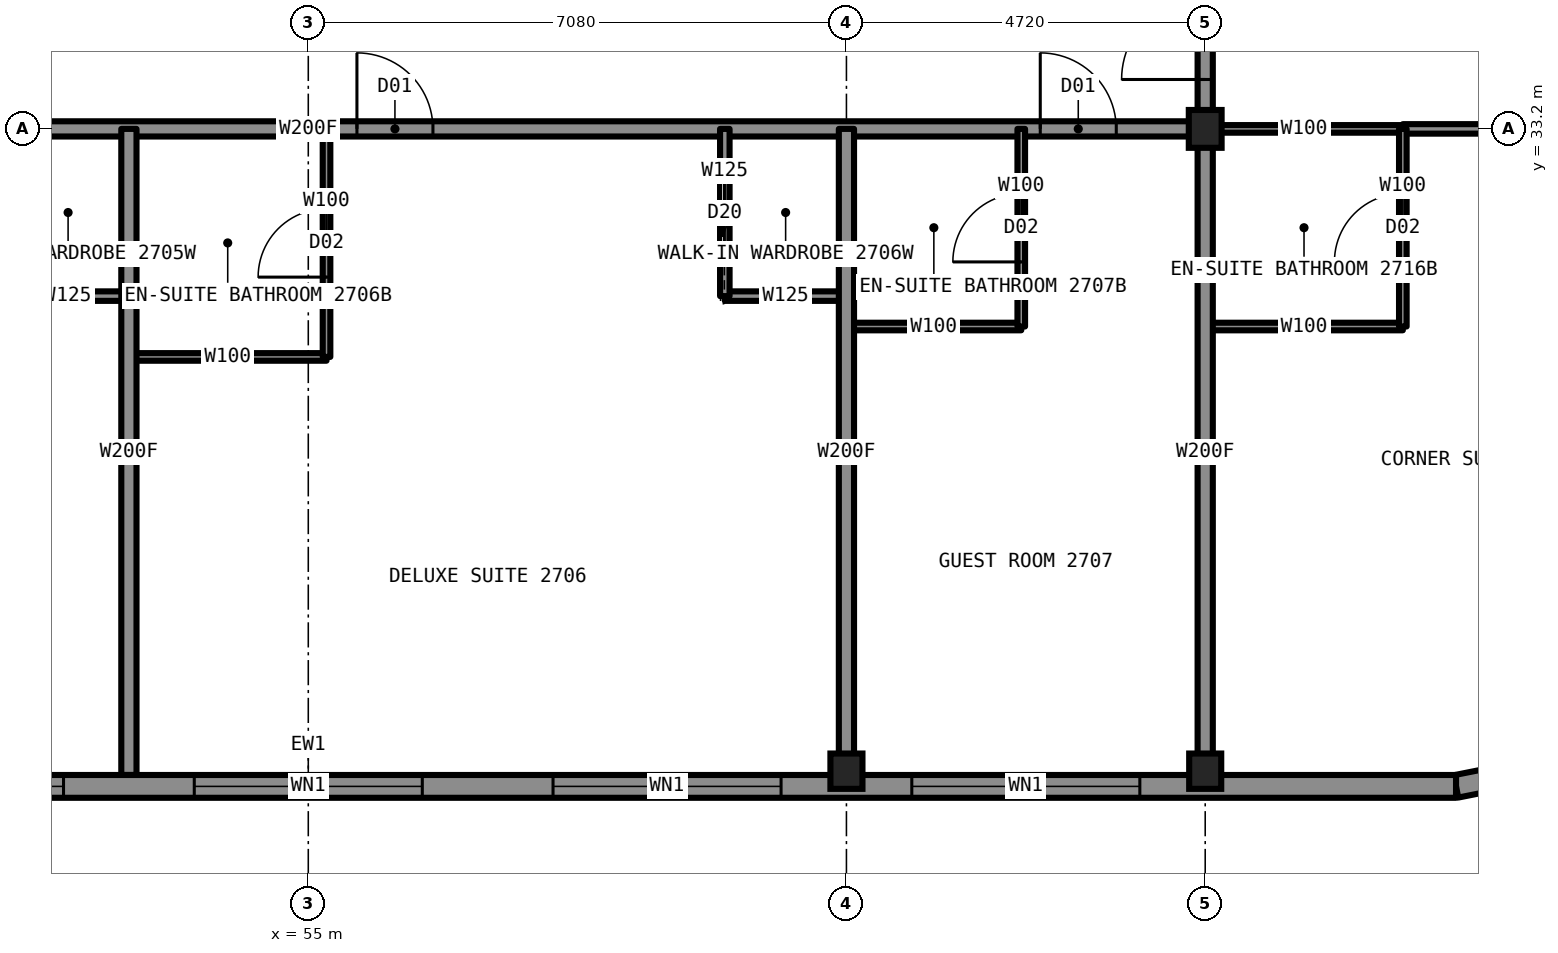
"""IFC4 building model, lengths in metres.
Left out: names, types, materials, properties, quantities, classifications, styles, units other than length and angle.
Written with IfcOpenShell. Run it as: python <this file> out.ifc"""

import sys

from ifc_helpers import new_model, si_unit, direction, frame, frame_2d, origin, origin_2d, place, context, subcontext, project, spatial, rectangle, i_section, extrude, element, fill, save


model = new_model("IFC4")
c1 = context("Model", 3, precision=1e-05, world=origin(), true_north=direction((0.0, 1.0)))
c2 = subcontext(c1, "Body", "Model", "MODEL_VIEW")
j1 = project(units=[si_unit("LENGTHUNIT", "METRE"), si_unit("PLANEANGLEUNIT", "RADIAN")], contexts=[c1])
p1 = place(None, origin())
s1 = spatial("IfcSite", under=j1, at=p1, CompositionType="ELEMENT")
p2 = place(p1, origin())
s2 = spatial("IfcBuilding", under=s1, at=p2, CompositionType="ELEMENT")
p3 = place(p2, frame((0.0, 0.0, 103.9)))
s3 = spatial("IfcBuildingStorey", under=s2, at=p3, CompositionType="ELEMENT", Elevation=103.9)
for number, where, z_axis, x_axis in (
    (1, (62.08, 24.75, 0.0), (0.0, 0.0, 1.0), (1.0, 0.0, 0.0)),
    (2, (66.8, 24.75, 0.0), (0.0, 0.0, 1.0), (1.0, 0.0, 0.0)),
):
    element("IfcColumn", number, at=place(p3, frame(where, z_axis=z_axis, x_axis=x_axis)), inside=s3, PredefinedType="COLUMN", context=c2, shape_type="SweptSolid", body=[
        extrude(i_section(OverallWidth=0.422, OverallDepth=0.465, WebThickness=0.045, FlangeThickness=0.073, at=origin_2d()), origin(), (0.0, 0.0, 1.0), 3.5),
    ])
p4 = place(p3, frame((66.8, 33.2, 0.0), z_axis=(0.0, 0.0, 1.0), x_axis=(1.0, 0.0, 0.0)))
e3 = element("IfcColumn", 3, at=p4, inside=s3, PredefinedType="COLUMN", context=c2, shape_type="SweptSolid", body=[
    extrude(i_section(OverallWidth=0.432, OverallDepth=0.498, WebThickness=0.056, FlangeThickness=0.089, at=origin_2d()), origin(), (0.0, 0.0, 1.0), 3.5),
])
p5 = place(p3, frame((66.8, 33.2, 0.0), z_axis=(0.0, 0.0, 1.0), x_axis=(1.0, 0.0, 0.0)))
e4 = element("IfcWall", 4, at=p5, inside=s3, PredefinedType="PARTITIONING", context=c2, shape_type="SweptSolid", body=[
    extrude(rectangle(XDim=2.6, YDim=0.1, at=frame_2d((1.3, 0.0))), origin(), (0.0, 0.0, 1.0), 2.573),
])
p6 = place(p3, frame((43.2, 33.2, 0.0), z_axis=(0.0, 0.0, 1.0), x_axis=(1.0, 0.0, 0.0)))
e5 = element("IfcWall", 5, at=p6, inside=s3, PredefinedType="PARTITIONING", context=c2, shape_type="SweptSolid", body=[
    extrude(rectangle(XDim=23.6, YDim=0.2, at=frame_2d((11.8, 0.0))), origin(), (0.0, 0.0, 1.0), 3.33),
])
p7 = place(p6, frame((3.0, 0.0, 0.0)))
e6 = element("IfcOpeningElement", 6, at=p7, cuts=e5, PredefinedType="OPENING", context=c2, shape_type="SweptSolid", body=[
    extrude(rectangle(XDim=1.0, YDim=2.2, at=frame_2d((0.5, 1.1))), frame((0.0, 0.11, 0.0), z_axis=(0.0, -1.0, 0.0), x_axis=(1.0, 0.0, 0.0)), (0.0, 0.0, 1.0), 0.22),
])
p8 = place(p6, frame((12.44, 0.0, 0.0)))
e7 = element("IfcOpeningElement", 7, at=p8, cuts=e5, PredefinedType="OPENING", context=c2, shape_type="SweptSolid", body=[
    extrude(rectangle(XDim=1.0, YDim=2.2, at=frame_2d((0.5, 1.1))), frame((0.0, 0.11, 0.0), z_axis=(0.0, -1.0, 0.0), x_axis=(1.0, 0.0, 0.0)), (0.0, 0.0, 1.0), 0.22),
])
p9 = place(p6, frame((21.43, 0.0, 0.0)))
e8 = element("IfcOpeningElement", 8, at=p9, cuts=e5, PredefinedType="OPENING", context=c2, shape_type="SweptSolid", body=[
    extrude(rectangle(XDim=1.0, YDim=2.2, at=frame_2d((0.5, 1.1))), frame((0.0, 0.11, 0.0), z_axis=(0.0, -1.0, 0.0), x_axis=(1.0, 0.0, 0.0)), (0.0, 0.0, 1.0), 0.22),
])
p10 = place(p3, frame((69.4, 33.2, 0.0), z_axis=(0.0, 0.0, 1.0), x_axis=(1.0, 0.0, 0.0)))
e9 = element("IfcWall", 9, at=p10, inside=s3, PredefinedType="PARTITIONING", context=c2, shape_type="SweptSolid", body=[
    extrude(rectangle(XDim=5.9, YDim=0.125, at=frame_2d((2.95, 0.0))), origin(), (0.0, 0.0, 1.0), 2.573),
])
p11 = place(p10, frame((1.15, 0.0, 0.0)))
e10 = element("IfcOpeningElement", 10, at=p11, cuts=e9, PredefinedType="OPENING", context=c2, shape_type="SweptSolid", body=[
    extrude(rectangle(XDim=0.9, YDim=2.2, at=frame_2d((0.45, 1.1))), frame((0.0, 0.073, 0.0), z_axis=(0.0, -1.0, 0.0), x_axis=(1.0, 0.0, 0.0)), (0.0, 0.0, 1.0), 0.145),
])
p12 = place(p3, frame((51.04, 31.0, 0.0), z_axis=(0.0, 0.0, 1.0), x_axis=(1.0, 0.0, 0.0)))
e11 = element("IfcWall", 11, at=p12, inside=s3, PredefinedType="PARTITIONING", context=c2, shape_type="SweptSolid", body=[
    extrude(rectangle(XDim=1.6, YDim=0.125, at=frame_2d((0.8, 0.0))), origin(), (0.0, 0.0, 1.0), 3.33),
])
p13 = place(p3, frame((60.48, 31.0, 0.0), z_axis=(0.0, 0.0, 1.0), x_axis=(1.0, 0.0, 0.0)))
e12 = element("IfcWall", 12, at=p13, inside=s3, PredefinedType="PARTITIONING", context=c2, shape_type="SweptSolid", body=[
    extrude(rectangle(XDim=1.6, YDim=0.125, at=frame_2d((0.8, 0.0))), origin(), (0.0, 0.0, 1.0), 3.33),
])
p14 = place(p3, frame((62.08, 30.6, 0.0), z_axis=(0.0, 0.0, 1.0), x_axis=(1.0, 0.0, 0.0)))
e13 = element("IfcWall", 13, at=p14, inside=s3, PredefinedType="PARTITIONING", context=c2, shape_type="SweptSolid", body=[
    extrude(rectangle(XDim=2.3, YDim=0.1, at=frame_2d((1.15, 0.0))), origin(), (0.0, 0.0, 1.0), 3.33),
])
p15 = place(p3, frame((66.8, 30.6, 0.0), z_axis=(0.0, 0.0, 1.0), x_axis=(1.0, 0.0, 0.0)))
e14 = element("IfcWall", 14, at=p15, inside=s3, PredefinedType="PARTITIONING", context=c2, shape_type="SweptSolid", body=[
    extrude(rectangle(XDim=2.6, YDim=0.1, at=frame_2d((1.3, 0.0))), origin(), (0.0, 0.0, 1.0), 3.33),
])
p16 = place(p3, frame((52.64, 30.2, 0.0), z_axis=(0.0, 0.0, 1.0), x_axis=(1.0, 0.0, 0.0)))
e15 = element("IfcWall", 15, at=p16, inside=s3, PredefinedType="PARTITIONING", context=c2, shape_type="SweptSolid", body=[
    extrude(rectangle(XDim=2.6, YDim=0.1, at=frame_2d((1.3, 0.0))), origin(), (0.0, 0.0, 1.0), 3.33),
])
p17 = place(p3, frame((52.64, 24.7, 0.0), z_axis=(0.0, 0.0, 1.0), x_axis=(0.0, 1.0, 0.0)))
e16 = element("IfcWall", 16, at=p17, inside=s3, PredefinedType="PARTITIONING", context=c2, shape_type="SweptSolid", body=[
    extrude(rectangle(XDim=8.5, YDim=0.2, at=frame_2d((4.25, 0.0))), origin(), (0.0, 0.0, 1.0), 3.33),
])
p18 = place(p3, frame((55.24, 30.2, 0.0), z_axis=(0.0, 0.0, 1.0), x_axis=(0.0, 1.0, 0.0)))
e17 = element("IfcWall", 17, at=p18, inside=s3, PredefinedType="PARTITIONING", context=c2, shape_type="SweptSolid", body=[
    extrude(rectangle(XDim=3.0, YDim=0.1, at=frame_2d((1.5, 0.0))), origin(), (0.0, 0.0, 1.0), 3.33),
])
p19 = place(p18, frame((1.05, 0.0, 0.0)))
e18 = element("IfcOpeningElement", 18, at=p19, cuts=e17, PredefinedType="OPENING", context=c2, shape_type="SweptSolid", body=[
    extrude(rectangle(XDim=0.9, YDim=2.1, at=frame_2d((0.45, 1.05))), frame((0.0, 0.06, 0.0), z_axis=(0.0, -1.0, 0.0), x_axis=(1.0, 0.0, 0.0)), (0.0, 0.0, 1.0), 0.12),
])
p20 = place(p3, frame((66.8, 33.2, 0.0), z_axis=(0.0, 0.0, 1.0), x_axis=(0.0, 1.0, 0.0)))
e19 = element("IfcWall", 19, at=p20, inside=s3, PredefinedType="PARTITIONING", context=c2, shape_type="SweptSolid", body=[
    extrude(rectangle(XDim=23.58, YDim=0.2, at=frame_2d((11.79, 0.0))), origin(), (0.0, 0.0, 1.0), 3.33),
])
p21 = place(p20, frame((6.98, 0.0, 0.0)))
e20 = element("IfcOpeningElement", 20, at=p21, cuts=e19, PredefinedType="OPENING", context=c2, shape_type="SweptSolid", body=[
    extrude(rectangle(XDim=1.0, YDim=2.2, at=frame_2d((0.5, 1.1))), frame((0.0, 0.11, 0.0), z_axis=(0.0, -1.0, 0.0), x_axis=(1.0, 0.0, 0.0)), (0.0, 0.0, 1.0), 0.22),
])
p22 = place(p20, frame((12.59, 0.0, 0.0)))
e21 = element("IfcOpeningElement", 21, at=p22, cuts=e19, PredefinedType="OPENING", context=c2, shape_type="SweptSolid", body=[
    extrude(rectangle(XDim=1.0, YDim=2.2, at=frame_2d((0.5, 1.1))), frame((0.0, 0.11, 0.0), z_axis=(0.0, -1.0, 0.0), x_axis=(1.0, 0.0, 0.0)), (0.0, 0.0, 1.0), 0.22),
])
p23 = place(p20, frame((16.42, 0.0, 0.0)))
e22 = element("IfcOpeningElement", 22, at=p23, cuts=e19, PredefinedType="OPENING", context=c2, shape_type="SweptSolid", body=[
    extrude(rectangle(XDim=1.0, YDim=2.2, at=frame_2d((0.5, 1.1))), frame((0.0, 0.11, 0.0), z_axis=(0.0, -1.0, 0.0), x_axis=(1.0, 0.0, 0.0)), (0.0, 0.0, 1.0), 0.22),
])
p24 = place(p20, frame((21.85, 0.0, 0.0)))
e23 = element("IfcOpeningElement", 23, at=p24, cuts=e19, PredefinedType="OPENING", context=c2, shape_type="SweptSolid", body=[
    extrude(rectangle(XDim=1.1, YDim=2.2, at=frame_2d((0.55, 1.1))), frame((0.0, 0.11, 0.0), z_axis=(0.0, -1.0, 0.0), x_axis=(1.0, 0.0, 0.0)), (0.0, 0.0, 1.0), 0.22),
])
p25 = place(p20, frame((0.65, 0.0, 0.0)))
e24 = element("IfcOpeningElement", 24, at=p25, cuts=e19, PredefinedType="OPENING", context=c2, shape_type="SweptSolid", body=[
    extrude(rectangle(XDim=1.1, YDim=2.2, at=frame_2d((0.55, 1.1))), frame((0.0, 0.11, 0.0), z_axis=(0.0, -1.0, 0.0), x_axis=(1.0, 0.0, 0.0)), (0.0, 0.0, 1.0), 0.22),
])
p26 = place(p3, frame((66.8, 24.7, 0.0), z_axis=(0.0, 0.0, 1.0), x_axis=(0.0, 1.0, 0.0)))
e25 = element("IfcWall", 25, at=p26, inside=s3, PredefinedType="PARTITIONING", context=c2, shape_type="SweptSolid", body=[
    extrude(rectangle(XDim=8.5, YDim=0.2, at=frame_2d((4.25, 0.0))), origin(), (0.0, 0.0, 1.0), 2.573),
])
p27 = place(p3, frame((69.4, 30.6, 0.0), z_axis=(0.0, 0.0, 1.0), x_axis=(0.0, 1.0, 0.0)))
e26 = element("IfcWall", 26, at=p27, inside=s3, PredefinedType="PARTITIONING", context=c2, shape_type="SweptSolid", body=[
    extrude(rectangle(XDim=2.6, YDim=0.1, at=frame_2d((1.3, 0.0))), origin(), (0.0, 0.0, 1.0), 3.33),
])
p28 = place(p27, frame((0.85, 0.0, 0.0)))
e27 = element("IfcOpeningElement", 27, at=p28, cuts=e26, PredefinedType="OPENING", context=c2, shape_type="SweptSolid", body=[
    extrude(rectangle(XDim=0.9, YDim=2.1, at=frame_2d((0.45, 1.05))), frame((0.0, 0.06, 0.0), z_axis=(0.0, -1.0, 0.0), x_axis=(1.0, 0.0, 0.0)), (0.0, 0.0, 1.0), 0.12),
])
p29 = place(p3, frame((60.48, 31.0, 0.0), z_axis=(0.0, 0.0, 1.0), x_axis=(0.0, 1.0, 0.0)))
e28 = element("IfcWall", 28, at=p29, inside=s3, PredefinedType="PARTITIONING", context=c2, shape_type="SweptSolid", body=[
    extrude(rectangle(XDim=2.2, YDim=0.125, at=frame_2d((1.1, 0.0))), origin(), (0.0, 0.0, 1.0), 3.33),
])
p30 = place(p29, frame((0.7, 0.0, 0.0)))
e29 = element("IfcOpeningElement", 29, at=p30, cuts=e28, PredefinedType="OPENING", context=c2, shape_type="SweptSolid", body=[
    extrude(rectangle(XDim=0.8, YDim=2.1, at=frame_2d((0.4, 1.05))), frame((0.0, 0.073, 0.0), z_axis=(0.0, -1.0, 0.0), x_axis=(1.0, 0.0, 0.0)), (0.0, 0.0, 1.0), 0.145),
])
p31 = place(p3, frame((62.08, 24.7, 0.0), z_axis=(0.0, 0.0, 1.0), x_axis=(0.0, 1.0, 0.0)))
e30 = element("IfcWall", 30, at=p31, inside=s3, PredefinedType="PARTITIONING", context=c2, shape_type="SweptSolid", body=[
    extrude(rectangle(XDim=8.5, YDim=0.2, at=frame_2d((4.25, 0.0))), origin(), (0.0, 0.0, 1.0), 2.573),
])
p32 = place(p3, frame((64.38, 30.6, 0.0), z_axis=(0.0, 0.0, 1.0), x_axis=(0.0, 1.0, 0.0)))
e31 = element("IfcWall", 31, at=p32, inside=s3, PredefinedType="PARTITIONING", context=c2, shape_type="SweptSolid", body=[
    extrude(rectangle(XDim=2.6, YDim=0.1, at=frame_2d((1.3, 0.0))), origin(), (0.0, 0.0, 1.0), 3.33),
])
p33 = place(p32, frame((0.85, 0.0, 0.0)))
e32 = element("IfcOpeningElement", 32, at=p33, cuts=e31, PredefinedType="OPENING", context=c2, shape_type="SweptSolid", body=[
    extrude(rectangle(XDim=0.9, YDim=2.1, at=frame_2d((0.45, 1.05))), frame((0.0, 0.06, 0.0), z_axis=(0.0, -1.0, 0.0), x_axis=(1.0, 0.0, 0.0)), (0.0, 0.0, 1.0), 0.12),
])
p34 = place(p3, frame((70.1, 24.55, 0.0), z_axis=(0.0, 0.0, 1.0), x_axis=(0.980787050784, 0.195081421501, 0.0)))
e33 = element("IfcWall", 33, at=p34, inside=s3, PredefinedType="SOLIDWALL", context=c2, shape_type="SweptSolid", body=[
    extrude(rectangle(XDim=2.087, YDim=0.3, at=frame_2d((1.044, 0.0))), origin(), (0.0, 0.0, 1.0), 3.33),
])
p35 = place(p34, frame((0.444, 0.0, 0.5)))
e34 = element("IfcOpeningElement", 34, at=p35, cuts=e33, PredefinedType="OPENING", context=c2, shape_type="SweptSolid", body=[
    extrude(rectangle(XDim=1.2, YDim=2.0, at=frame_2d((0.6, 1.0))), frame((0.0, 0.16, 0.0), z_axis=(0.0, -1.0, 0.0), x_axis=(1.0, 0.0, 0.0)), (0.0, 0.0, 1.0), 0.32),
])
p36 = place(p3, frame((39.9, 24.55, 0.0), z_axis=(0.0, 0.0, 1.0), x_axis=(1.0, 0.0, 0.0)))
e35 = element("IfcWall", 35, at=p36, inside=s3, PredefinedType="SOLIDWALL", context=c2, shape_type="SweptSolid", body=[
    extrude(rectangle(XDim=30.2, YDim=0.3, at=frame_2d((15.1, 0.0))), origin(), (0.0, 0.0, 1.0), 2.83),
])
p37 = place(p36, frame((4.16, 0.0, 0.5)))
e36 = element("IfcOpeningElement", 36, at=p37, cuts=e35, PredefinedType="OPENING", context=c2, shape_type="SweptSolid", body=[
    extrude(rectangle(XDim=3.0, YDim=2.0, at=frame_2d((1.5, 1.0))), frame((0.0, 0.16, 0.0), z_axis=(0.0, -1.0, 0.0), x_axis=(1.0, 0.0, 0.0)), (0.0, 0.0, 1.0), 0.32),
])
p38 = place(p36, frame((8.88, 0.0, 0.5)))
e37 = element("IfcOpeningElement", 37, at=p38, cuts=e35, PredefinedType="OPENING", context=c2, shape_type="SweptSolid", body=[
    extrude(rectangle(XDim=3.0, YDim=2.0, at=frame_2d((1.5, 1.0))), frame((0.0, 0.16, 0.0), z_axis=(0.0, -1.0, 0.0), x_axis=(1.0, 0.0, 0.0)), (0.0, 0.0, 1.0), 0.32),
])
p39 = place(p36, frame((13.6, 0.0, 0.5)))
e38 = element("IfcOpeningElement", 38, at=p39, cuts=e35, PredefinedType="OPENING", context=c2, shape_type="SweptSolid", body=[
    extrude(rectangle(XDim=3.0, YDim=2.0, at=frame_2d((1.5, 1.0))), frame((0.0, 0.16, 0.0), z_axis=(0.0, -1.0, 0.0), x_axis=(1.0, 0.0, 0.0)), (0.0, 0.0, 1.0), 0.32),
])
p40 = place(p36, frame((18.32, 0.0, 0.5)))
e39 = element("IfcOpeningElement", 39, at=p40, cuts=e35, PredefinedType="OPENING", context=c2, shape_type="SweptSolid", body=[
    extrude(rectangle(XDim=3.0, YDim=2.0, at=frame_2d((1.5, 1.0))), frame((0.0, 0.16, 0.0), z_axis=(0.0, -1.0, 0.0), x_axis=(1.0, 0.0, 0.0)), (0.0, 0.0, 1.0), 0.32),
])
p41 = place(p36, frame((23.04, 0.0, 0.5)))
e40 = element("IfcOpeningElement", 40, at=p41, cuts=e35, PredefinedType="OPENING", context=c2, shape_type="SweptSolid", body=[
    extrude(rectangle(XDim=3.0, YDim=2.0, at=frame_2d((1.5, 1.0))), frame((0.0, 0.16, 0.0), z_axis=(0.0, -1.0, 0.0), x_axis=(1.0, 0.0, 0.0)), (0.0, 0.0, 1.0), 0.32),
])
p42 = place(p8, origin())
e41 = element("IfcDoor", 41, at=p42, inside=s3, OperationType="SINGLE_SWING_LEFT", PredefinedType="DOOR", context=c2, shape_type="SweptSolid", body=[
    extrude(rectangle(XDim=1.0, YDim=2.2, at=frame_2d((0.5, 1.1))), frame((0.0, 0.025, 0.0), z_axis=(0.0, -1.0, 0.0), x_axis=(1.0, 0.0, 0.0)), (0.0, 0.0, 1.0), 0.05),
])
fill(e7, e41)
p43 = place(p19, origin())
e42 = element("IfcDoor", 42, at=p43, inside=s3, OperationType="SINGLE_SWING_RIGHT", PredefinedType="DOOR", context=c2, shape_type="SweptSolid", body=[
    extrude(rectangle(XDim=0.9, YDim=2.1, at=frame_2d((0.45, 1.05))), frame((0.0, 0.025, 0.0), z_axis=(0.0, -1.0, 0.0), x_axis=(1.0, 0.0, 0.0)), (0.0, 0.0, 1.0), 0.05),
])
fill(e18, e42)
p44 = place(p30, origin())
e43 = element("IfcDoor", 43, at=p44, inside=s3, OperationType="SLIDING_TO_LEFT", PredefinedType="DOOR", context=c2, shape_type="SweptSolid", body=[
    extrude(rectangle(XDim=0.8, YDim=2.1, at=frame_2d((0.4, 1.05))), frame((0.0, 0.025, 0.0), z_axis=(0.0, -1.0, 0.0), x_axis=(1.0, 0.0, 0.0)), (0.0, 0.0, 1.0), 0.05),
])
fill(e29, e43)
p45 = place(p9, origin())
e44 = element("IfcDoor", 44, at=p45, inside=s3, OperationType="SINGLE_SWING_LEFT", PredefinedType="DOOR", context=c2, shape_type="SweptSolid", body=[
    extrude(rectangle(XDim=1.0, YDim=2.2, at=frame_2d((0.5, 1.1))), frame((0.0, 0.025, 0.0), z_axis=(0.0, -1.0, 0.0), x_axis=(1.0, 0.0, 0.0)), (0.0, 0.0, 1.0), 0.05),
])
fill(e8, e44)
p46 = place(p33, origin())
e45 = element("IfcDoor", 45, at=p46, inside=s3, OperationType="SINGLE_SWING_RIGHT", PredefinedType="DOOR", context=c2, shape_type="SweptSolid", body=[
    extrude(rectangle(XDim=0.9, YDim=2.1, at=frame_2d((0.45, 1.05))), frame((0.0, 0.025, 0.0), z_axis=(0.0, -1.0, 0.0), x_axis=(1.0, 0.0, 0.0)), (0.0, 0.0, 1.0), 0.05),
])
fill(e32, e45)
p47 = place(p25, origin())
e46 = element("IfcDoor", 46, at=p47, inside=s3, OperationType="SINGLE_SWING_LEFT", PredefinedType="DOOR", context=c2, shape_type="SweptSolid", body=[
    extrude(rectangle(XDim=1.1, YDim=2.2, at=frame_2d((0.55, 1.1))), frame((0.0, 0.025, 0.0), z_axis=(0.0, -1.0, 0.0), x_axis=(1.0, 0.0, 0.0)), (0.0, 0.0, 1.0), 0.05),
])
fill(e24, e46)
p48 = place(p28, origin())
e47 = element("IfcDoor", 47, at=p48, inside=s3, OperationType="SINGLE_SWING_RIGHT", PredefinedType="DOOR", context=c2, shape_type="SweptSolid", body=[
    extrude(rectangle(XDim=0.9, YDim=2.1, at=frame_2d((0.45, 1.05))), frame((0.0, 0.025, 0.0), z_axis=(0.0, -1.0, 0.0), x_axis=(1.0, 0.0, 0.0)), (0.0, 0.0, 1.0), 0.05),
])
fill(e27, e47)
p49 = place(p38, origin())
e48 = element("IfcWindow", 48, at=p49, inside=s3, PartitioningType="SINGLE_PANEL", PredefinedType="WINDOW", context=c2, shape_type="SweptSolid", body=[
    extrude(rectangle(XDim=3.0, YDim=2.0, at=frame_2d((1.5, 1.0))), frame((0.0, 0.03, 0.0), z_axis=(0.0, -1.0, 0.0), x_axis=(1.0, 0.0, 0.0)), (0.0, 0.0, 1.0), 0.06),
])
fill(e37, e48)
p50 = place(p39, origin())
e49 = element("IfcWindow", 49, at=p50, inside=s3, PartitioningType="SINGLE_PANEL", PredefinedType="WINDOW", context=c2, shape_type="SweptSolid", body=[
    extrude(rectangle(XDim=3.0, YDim=2.0, at=frame_2d((1.5, 1.0))), frame((0.0, 0.03, 0.0), z_axis=(0.0, -1.0, 0.0), x_axis=(1.0, 0.0, 0.0)), (0.0, 0.0, 1.0), 0.06),
])
fill(e38, e49)
p51 = place(p40, origin())
e50 = element("IfcWindow", 50, at=p51, inside=s3, PartitioningType="SINGLE_PANEL", PredefinedType="WINDOW", context=c2, shape_type="SweptSolid", body=[
    extrude(rectangle(XDim=3.0, YDim=2.0, at=frame_2d((1.5, 1.0))), frame((0.0, 0.03, 0.0), z_axis=(0.0, -1.0, 0.0), x_axis=(1.0, 0.0, 0.0)), (0.0, 0.0, 1.0), 0.06),
])
fill(e39, e50)
p52 = place(p41, origin())
e51 = element("IfcWindow", 51, at=p52, inside=s3, PartitioningType="SINGLE_PANEL", PredefinedType="WINDOW", context=c2, shape_type="SweptSolid", body=[
    extrude(rectangle(XDim=3.0, YDim=2.0, at=frame_2d((1.5, 1.0))), frame((0.0, 0.03, 0.0), z_axis=(0.0, -1.0, 0.0), x_axis=(1.0, 0.0, 0.0)), (0.0, 0.0, 1.0), 0.06),
])
fill(e40, e51)
save(model, sys.argv[1])
